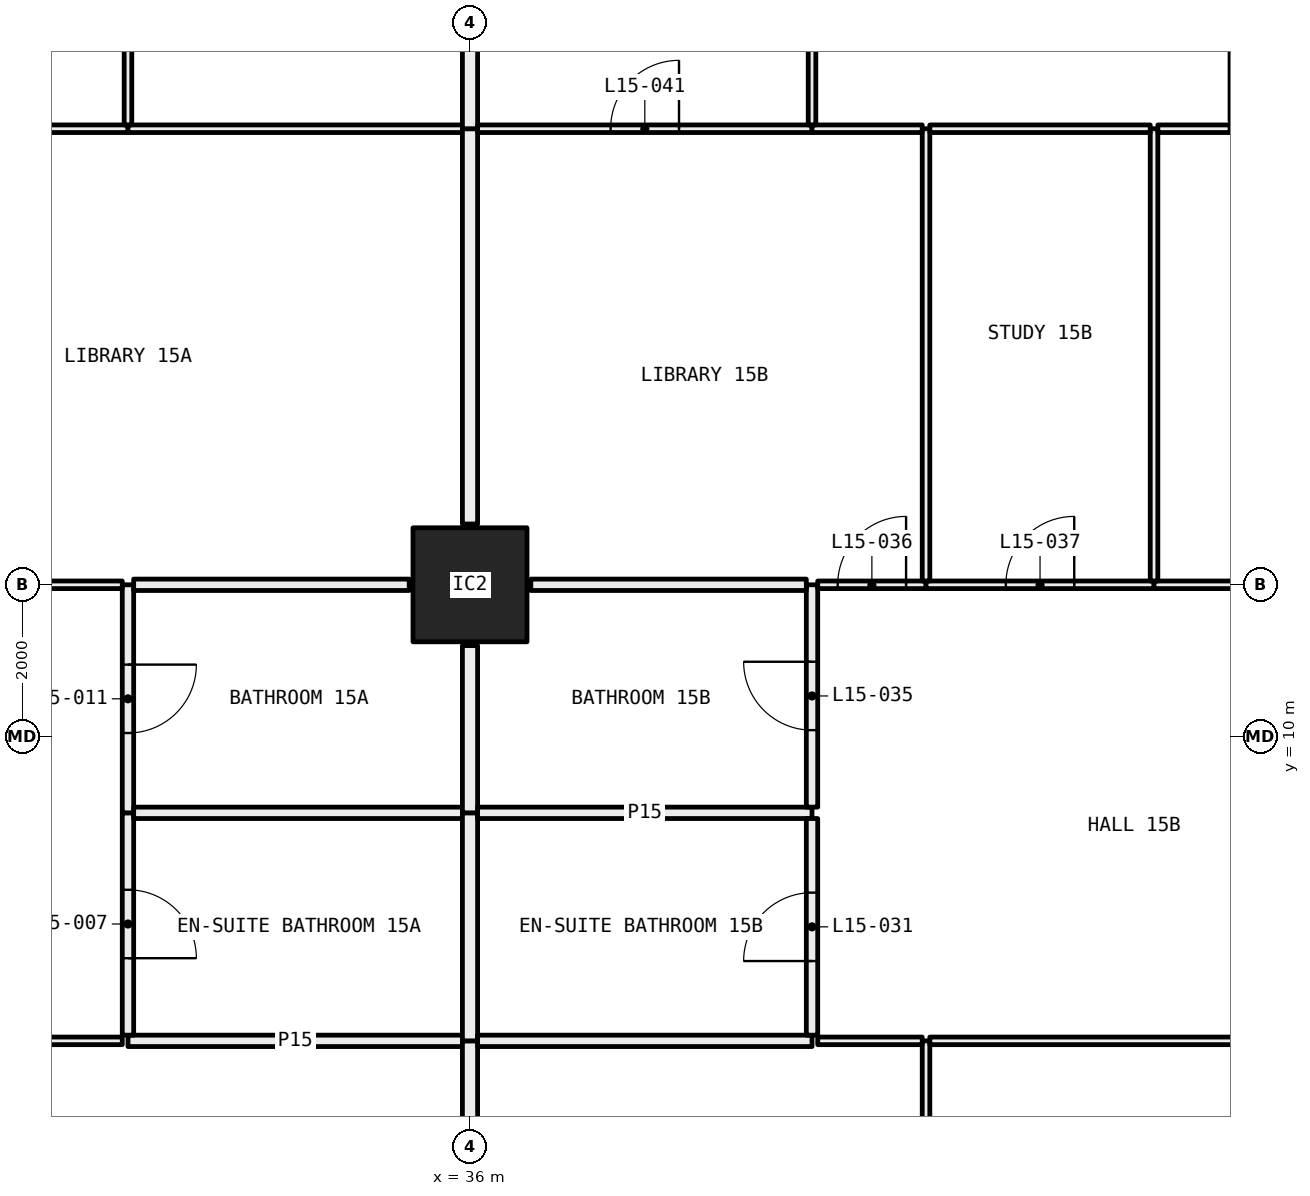
"""IFC4 building model, lengths in metres.
Left out: names, types, materials, properties, quantities, classifications, styles, units other than length and angle.
Written with IfcOpenShell. Run it as: python <this file> out.ifc"""

import sys

from ifc_helpers import new_model, si_unit, direction, frame, frame_2d, origin, origin_2d, place, context, subcontext, project, spatial, rectangle, hollow_rectangle, extrude, element, fill, save


model = new_model("IFC4")
c1 = context("Model", 3, precision=1e-05, world=origin(), true_north=direction((0.0, 1.0)))
c2 = subcontext(c1, "Body", "Model", "MODEL_VIEW")
j1 = project(units=[si_unit("LENGTHUNIT", "METRE"), si_unit("PLANEANGLEUNIT", "RADIAN")], contexts=[c1])
p1 = place(None, origin())
s1 = spatial("IfcSite", under=j1, at=p1, CompositionType="ELEMENT")
p2 = place(p1, origin())
s2 = spatial("IfcBuilding", under=s1, at=p2, CompositionType="ELEMENT")
p3 = place(p2, frame((0.0, 0.0, 64.5)))
s3 = spatial("IfcBuildingStorey", under=s2, at=p3, CompositionType="ELEMENT", Elevation=64.5)
p4 = place(p3, frame((36.0, 12.0, 0.0), z_axis=(0.0, 0.0, 1.0), x_axis=(1.0, 0.0, 0.0)))
e1 = element("IfcColumn", 1, at=p4, inside=s3, PredefinedType="COLUMN", context=c2, shape_type="SweptSolid", body=[
    extrude(hollow_rectangle(XDim=1.5, YDim=1.5, WallThickness=0.065, at=origin_2d()), origin(), (0.0, 0.0, 1.0), 3.05),
])
p5 = place(p3, frame((31.425, 6.0, 0.0), z_axis=(0.0, 0.0, 1.0), x_axis=(-1.0, 0.0, 0.0)))
e2 = element("IfcWall", 2, at=p5, inside=s3, PredefinedType="PARTITIONING", context=c2, shape_type="SweptSolid", body=[
    extrude(rectangle(XDim=1.375, YDim=0.1, at=frame_2d((0.688, 0.0))), origin(), (0.0, 0.0, 1.0), 3.05),
])
p6 = place(p3, frame((35.9, 6.0, 0.0), z_axis=(0.0, 0.0, 1.0), x_axis=(-1.0, 0.0, 0.0)))
e3 = element("IfcWall", 3, at=p6, inside=s3, PredefinedType="PARTITIONING", context=c2, shape_type="SweptSolid", body=[
    extrude(rectangle(XDim=4.4, YDim=0.15, at=frame_2d((2.2, 0.0))), origin(), (0.0, 0.0, 1.0), 3.05),
])
p7 = place(p3, frame((36.0, 0.72, 0.0), z_axis=(0.0, 0.0, 1.0), x_axis=(0.0, 1.0, 0.0)))
e4 = element("IfcWall", 4, at=p7, inside=s3, PredefinedType="PARTITIONING", context=c2, shape_type="SweptSolid", body=[
    extrude(rectangle(XDim=5.28, YDim=0.2, at=frame_2d((2.64, 0.0))), origin(), (0.0, 0.0, 1.0), 2.45),
])
p8 = place(p3, frame((31.5, 6.075, 0.0), z_axis=(0.0, 0.0, 1.0), x_axis=(0.0, 1.0, 0.0)))
e5 = element("IfcWall", 5, at=p8, inside=s3, PredefinedType="PARTITIONING", context=c2, shape_type="SweptSolid", body=[
    extrude(rectangle(XDim=2.925, YDim=0.15, at=frame_2d((1.462, 0.0))), origin(), (0.0, 0.0, 1.0), 3.05),
])
p9 = place(p8, frame((1.012, 0.0, 0.0)))
e6 = element("IfcOpeningElement", 6, at=p9, cuts=e5, PredefinedType="OPENING", context=c2, shape_type="SweptSolid", body=[
    extrude(rectangle(XDim=0.9, YDim=2.1, at=frame_2d((0.45, 1.05))), frame((0.0, 0.085, 0.0), z_axis=(0.0, -1.0, 0.0), x_axis=(1.0, 0.0, 0.0)), (0.0, 0.0, 1.0), 0.17),
])
p10 = place(p3, frame((31.5, 9.0, 0.0), z_axis=(0.0, 0.0, 1.0), x_axis=(0.0, 1.0, 0.0)))
e7 = element("IfcWall", 7, at=p10, inside=s3, PredefinedType="PARTITIONING", context=c2, shape_type="SweptSolid", body=[
    extrude(rectangle(XDim=3.0, YDim=0.15, at=frame_2d((1.5, 0.0))), origin(), (0.0, 0.0, 1.0), 2.45),
])
p11 = place(p10, frame((1.05, 0.0, 0.0)))
e8 = element("IfcOpeningElement", 8, at=p11, cuts=e7, PredefinedType="OPENING", context=c2, shape_type="SweptSolid", body=[
    extrude(rectangle(XDim=0.9, YDim=2.1, at=frame_2d((0.45, 1.05))), frame((0.0, 0.085, 0.0), z_axis=(0.0, -1.0, 0.0), x_axis=(1.0, 0.0, 0.0)), (0.0, 0.0, 1.0), 0.17),
])
p12 = place(p3, frame((31.425, 12.0, 0.0), z_axis=(0.0, 0.0, 1.0), x_axis=(-1.0, 0.0, 0.0)))
e9 = element("IfcWall", 9, at=p12, inside=s3, PredefinedType="PARTITIONING", context=c2, shape_type="SweptSolid", body=[
    extrude(rectangle(XDim=4.425, YDim=0.1, at=frame_2d((2.212, 0.0))), origin(), (0.0, 0.0, 1.0), 2.45),
])
p13 = place(p12, frame((1.762, 0.0, 0.0)))
e10 = element("IfcOpeningElement", 10, at=p13, cuts=e9, PredefinedType="OPENING", context=c2, shape_type="SweptSolid", body=[
    extrude(rectangle(XDim=0.9, YDim=2.1, at=frame_2d((0.45, 1.05))), frame((0.0, 0.06, 0.0), z_axis=(0.0, -1.0, 0.0), x_axis=(1.0, 0.0, 0.0)), (0.0, 0.0, 1.0), 0.12),
])
p14 = place(p3, frame((35.9, 9.0, 0.0), z_axis=(0.0, 0.0, 1.0), x_axis=(-1.0, 0.0, 0.0)))
e11 = element("IfcWall", 11, at=p14, inside=s3, PredefinedType="PARTITIONING", context=c2, shape_type="SweptSolid", body=[
    extrude(rectangle(XDim=4.325, YDim=0.15, at=frame_2d((2.163, 0.0))), origin(), (0.0, 0.0, 1.0), 3.05),
])
p15 = place(p3, frame((36.0, 6.0, 0.0), z_axis=(0.0, 0.0, 1.0), x_axis=(0.0, 1.0, 0.0)))
e12 = element("IfcWall", 12, at=p15, inside=s3, PredefinedType="PARTITIONING", context=c2, shape_type="SweptSolid", body=[
    extrude(rectangle(XDim=3.0, YDim=0.2, at=frame_2d((1.5, 0.0))), origin(), (0.0, 0.0, 1.0), 2.45),
])
p16 = place(p3, frame((35.2, 12.0, 0.0), z_axis=(0.0, 0.0, 1.0), x_axis=(-1.0, 0.0, 0.0)))
e13 = element("IfcWall", 13, at=p16, inside=s3, PredefinedType="PARTITIONING", context=c2, shape_type="SweptSolid", body=[
    extrude(rectangle(XDim=3.625, YDim=0.15, at=frame_2d((1.812, 0.0))), origin(), (0.0, 0.0, 1.0), 2.45),
])
p17 = place(p3, frame((36.0, 9.0, 0.0), z_axis=(0.0, 0.0, 1.0), x_axis=(0.0, 1.0, 0.0)))
e14 = element("IfcWall", 14, at=p17, inside=s3, PredefinedType="PARTITIONING", context=c2, shape_type="SweptSolid", body=[
    extrude(rectangle(XDim=2.2, YDim=0.2, at=frame_2d((1.1, 0.0))), origin(), (0.0, 0.0, 1.0), 2.45),
])
p18 = place(p3, frame((31.5, 18.0, 0.0), z_axis=(0.0, 0.0, 1.0), x_axis=(-1.0, 0.0, 0.0)))
e15 = element("IfcWall", 15, at=p18, inside=s3, PredefinedType="PARTITIONING", context=c2, shape_type="SweptSolid", body=[
    extrude(rectangle(XDim=4.45, YDim=0.1, at=frame_2d((2.225, 0.0))), origin(), (0.0, 0.0, 1.0), 3.05),
])
p19 = place(p18, frame((1.775, 0.0, 0.0)))
e16 = element("IfcOpeningElement", 16, at=p19, cuts=e15, PredefinedType="OPENING", context=c2, shape_type="SweptSolid", body=[
    extrude(rectangle(XDim=0.9, YDim=2.1, at=frame_2d((0.45, 1.05))), frame((0.0, 0.06, 0.0), z_axis=(0.0, -1.0, 0.0), x_axis=(1.0, 0.0, 0.0)), (0.0, 0.0, 1.0), 0.12),
])
p20 = place(p3, frame((35.9, 18.0, 0.0), z_axis=(0.0, 0.0, 1.0), x_axis=(-1.0, 0.0, 0.0)))
e17 = element("IfcWall", 17, at=p20, inside=s3, PredefinedType="PARTITIONING", context=c2, shape_type="SweptSolid", body=[
    extrude(rectangle(XDim=4.4, YDim=0.1, at=frame_2d((2.2, 0.0))), origin(), (0.0, 0.0, 1.0), 3.05),
])
p21 = place(p3, frame((36.0, 12.8, 0.0), z_axis=(0.0, 0.0, 1.0), x_axis=(0.0, 1.0, 0.0)))
e18 = element("IfcWall", 18, at=p21, inside=s3, PredefinedType="PARTITIONING", context=c2, shape_type="SweptSolid", body=[
    extrude(rectangle(XDim=5.2, YDim=0.2, at=frame_2d((2.6, 0.0))), origin(), (0.0, 0.0, 1.0), 2.45),
])
p22 = place(p3, frame((31.5, 18.05, 0.0), z_axis=(0.0, 0.0, 1.0), x_axis=(0.0, 1.0, 0.0)))
e19 = element("IfcWall", 19, at=p22, inside=s3, PredefinedType="PARTITIONING", context=c2, shape_type="SweptSolid", body=[
    extrude(rectangle(XDim=6.25, YDim=0.1, at=frame_2d((3.125, 0.0))), origin(), (0.0, 0.0, 1.0), 2.45),
])
p23 = place(p22, frame((2.675, 0.0, 0.0)))
e20 = element("IfcOpeningElement", 20, at=p23, cuts=e19, PredefinedType="OPENING", context=c2, shape_type="SweptSolid", body=[
    extrude(rectangle(XDim=0.9, YDim=2.1, at=frame_2d((0.45, 1.05))), frame((0.0, 0.06, 0.0), z_axis=(0.0, -1.0, 0.0), x_axis=(1.0, 0.0, 0.0)), (0.0, 0.0, 1.0), 0.12),
])
p24 = place(p3, frame((36.0, 18.0, 0.0), z_axis=(0.0, 0.0, 1.0), x_axis=(0.0, 1.0, 0.0)))
e21 = element("IfcWall", 21, at=p24, inside=s3, PredefinedType="PARTITIONING", context=c2, shape_type="SweptSolid", body=[
    extrude(rectangle(XDim=5.2, YDim=0.2, at=frame_2d((2.6, 0.0))), origin(), (0.0, 0.0, 1.0), 2.45),
])
p25 = place(p3, frame((42.0, 0.72, 0.0), z_axis=(0.0, 0.0, 1.0), x_axis=(0.0, 1.0, 0.0)))
e22 = element("IfcWall", 22, at=p25, inside=s3, PredefinedType="PARTITIONING", context=c2, shape_type="SweptSolid", body=[
    extrude(rectangle(XDim=5.28, YDim=0.1, at=frame_2d((2.64, 0.0))), origin(), (0.0, 0.0, 1.0), 3.05),
])
p26 = place(p25, frame((2.19, 0.0, 0.0)))
e23 = element("IfcOpeningElement", 23, at=p26, cuts=e22, PredefinedType="OPENING", context=c2, shape_type="SweptSolid", body=[
    extrude(rectangle(XDim=0.9, YDim=2.1, at=frame_2d((0.45, 1.05))), frame((0.0, 0.06, 0.0), z_axis=(0.0, -1.0, 0.0), x_axis=(1.0, 0.0, 0.0)), (0.0, 0.0, 1.0), 0.12),
])
p27 = place(p3, frame((40.5, 6.0, 0.0), z_axis=(0.0, 0.0, 1.0), x_axis=(-1.0, 0.0, 0.0)))
e24 = element("IfcWall", 24, at=p27, inside=s3, PredefinedType="PARTITIONING", context=c2, shape_type="SweptSolid", body=[
    extrude(rectangle(XDim=4.4, YDim=0.15, at=frame_2d((2.2, 0.0))), origin(), (0.0, 0.0, 1.0), 3.05),
])
p28 = place(p3, frame((41.95, 6.0, 0.0), z_axis=(0.0, 0.0, 1.0), x_axis=(-1.0, 0.0, 0.0)))
e25 = element("IfcWall", 25, at=p28, inside=s3, PredefinedType="PARTITIONING", context=c2, shape_type="SweptSolid", body=[
    extrude(rectangle(XDim=1.375, YDim=0.1, at=frame_2d((0.688, 0.0))), origin(), (0.0, 0.0, 1.0), 3.05),
])
p29 = place(p3, frame((48.195, 6.0, 0.0), z_axis=(0.0, 0.0, 1.0), x_axis=(-1.0, 0.0, 0.0)))
e26 = element("IfcWall", 26, at=p29, inside=s3, PredefinedType="PARTITIONING", context=c2, shape_type="SweptSolid", body=[
    extrude(rectangle(XDim=6.145, YDim=0.1, at=frame_2d((3.073, 0.0))), origin(), (0.0, 0.0, 1.0), 2.45),
])
p30 = place(p3, frame((40.5, 9.0, 0.0), z_axis=(0.0, 0.0, 1.0), x_axis=(-1.0, 0.0, 0.0)))
e27 = element("IfcWall", 27, at=p30, inside=s3, PredefinedType="PARTITIONING", context=c2, shape_type="SweptSolid", body=[
    extrude(rectangle(XDim=4.4, YDim=0.15, at=frame_2d((2.2, 0.0))), origin(), (0.0, 0.0, 1.0), 3.05),
])
p31 = place(p3, frame((40.5, 6.075, 0.0), z_axis=(0.0, 0.0, 1.0), x_axis=(0.0, 1.0, 0.0)))
e28 = element("IfcWall", 28, at=p31, inside=s3, PredefinedType="PARTITIONING", context=c2, shape_type="SweptSolid", body=[
    extrude(rectangle(XDim=2.85, YDim=0.15, at=frame_2d((1.425, 0.0))), origin(), (0.0, 0.0, 1.0), 3.05),
])
p32 = place(p31, frame((0.975, 0.0, 0.0)))
e29 = element("IfcOpeningElement", 29, at=p32, cuts=e28, PredefinedType="OPENING", context=c2, shape_type="SweptSolid", body=[
    extrude(rectangle(XDim=0.9, YDim=2.1, at=frame_2d((0.45, 1.05))), frame((0.0, 0.085, 0.0), z_axis=(0.0, -1.0, 0.0), x_axis=(1.0, 0.0, 0.0)), (0.0, 0.0, 1.0), 0.17),
])
p33 = place(p3, frame((40.5, 9.075, 0.0), z_axis=(0.0, 0.0, 1.0), x_axis=(0.0, 1.0, 0.0)))
e30 = element("IfcWall", 30, at=p33, inside=s3, PredefinedType="PARTITIONING", context=c2, shape_type="SweptSolid", body=[
    extrude(rectangle(XDim=2.925, YDim=0.15, at=frame_2d((1.462, 0.0))), origin(), (0.0, 0.0, 1.0), 2.45),
])
p34 = place(p33, frame((1.012, 0.0, 0.0)))
e31 = element("IfcOpeningElement", 31, at=p34, cuts=e30, PredefinedType="OPENING", context=c2, shape_type="SweptSolid", body=[
    extrude(rectangle(XDim=0.9, YDim=2.1, at=frame_2d((0.45, 1.05))), frame((0.0, 0.085, 0.0), z_axis=(0.0, -1.0, 0.0), x_axis=(1.0, 0.0, 0.0)), (0.0, 0.0, 1.0), 0.17),
])
p35 = place(p3, frame((40.425, 12.0, 0.0), z_axis=(0.0, 0.0, 1.0), x_axis=(-1.0, 0.0, 0.0)))
e32 = element("IfcWall", 32, at=p35, inside=s3, PredefinedType="PARTITIONING", context=c2, shape_type="SweptSolid", body=[
    extrude(rectangle(XDim=3.625, YDim=0.15, at=frame_2d((1.812, 0.0))), origin(), (0.0, 0.0, 1.0), 2.45),
])
p36 = place(p3, frame((42.0, 12.0, 0.0), z_axis=(0.0, 0.0, 1.0), x_axis=(-1.0, 0.0, 0.0)))
e33 = element("IfcWall", 33, at=p36, inside=s3, PredefinedType="PARTITIONING", context=c2, shape_type="SweptSolid", body=[
    extrude(rectangle(XDim=1.425, YDim=0.1, at=frame_2d((0.712, 0.0))), origin(), (0.0, 0.0, 1.0), 2.45),
])
p37 = place(p36, frame((0.262, 0.0, 0.0)))
e34 = element("IfcOpeningElement", 34, at=p37, cuts=e33, PredefinedType="OPENING", context=c2, shape_type="SweptSolid", body=[
    extrude(rectangle(XDim=0.9, YDim=2.1, at=frame_2d((0.45, 1.05))), frame((0.0, 0.06, 0.0), z_axis=(0.0, -1.0, 0.0), x_axis=(1.0, 0.0, 0.0)), (0.0, 0.0, 1.0), 0.12),
])
p38 = place(p3, frame((45.0, 12.0, 0.0), z_axis=(0.0, 0.0, 1.0), x_axis=(-1.0, 0.0, 0.0)))
e35 = element("IfcWall", 35, at=p38, inside=s3, PredefinedType="PARTITIONING", context=c2, shape_type="SweptSolid", body=[
    extrude(rectangle(XDim=3.0, YDim=0.1, at=frame_2d((1.5, 0.0))), origin(), (0.0, 0.0, 1.0), 2.45),
])
p39 = place(p38, frame((1.05, 0.0, 0.0)))
e36 = element("IfcOpeningElement", 36, at=p39, cuts=e35, PredefinedType="OPENING", context=c2, shape_type="SweptSolid", body=[
    extrude(rectangle(XDim=0.9, YDim=2.1, at=frame_2d((0.45, 1.05))), frame((0.0, 0.06, 0.0), z_axis=(0.0, -1.0, 0.0), x_axis=(1.0, 0.0, 0.0)), (0.0, 0.0, 1.0), 0.12),
])
p40 = place(p3, frame((47.2, 12.0, 0.0), z_axis=(0.0, 0.0, 1.0), x_axis=(-1.0, 0.0, 0.0)))
e37 = element("IfcWall", 37, at=p40, inside=s3, PredefinedType="PARTITIONING", context=c2, shape_type="SweptSolid", body=[
    extrude(rectangle(XDim=2.2, YDim=0.1, at=frame_2d((1.1, 0.0))), origin(), (0.0, 0.0, 1.0), 2.45),
])
p41 = place(p3, frame((42.0, 12.05, 0.0), z_axis=(0.0, 0.0, 1.0), x_axis=(0.0, 1.0, 0.0)))
e38 = element("IfcWall", 38, at=p41, inside=s3, PredefinedType="PARTITIONING", context=c2, shape_type="SweptSolid", body=[
    extrude(rectangle(XDim=5.95, YDim=0.1, at=frame_2d((2.975, 0.0))), origin(), (0.0, 0.0, 1.0), 2.45),
])
p42 = place(p3, frame((40.5, 18.0, 0.0), z_axis=(0.0, 0.0, 1.0), x_axis=(-1.0, 0.0, 0.0)))
e39 = element("IfcWall", 39, at=p42, inside=s3, PredefinedType="PARTITIONING", context=c2, shape_type="SweptSolid", body=[
    extrude(rectangle(XDim=4.4, YDim=0.1, at=frame_2d((2.2, 0.0))), origin(), (0.0, 0.0, 1.0), 3.05),
])
p43 = place(p42, frame((1.75, 0.0, 0.0)))
e40 = element("IfcOpeningElement", 40, at=p43, cuts=e39, PredefinedType="OPENING", context=c2, shape_type="SweptSolid", body=[
    extrude(rectangle(XDim=0.9, YDim=2.1, at=frame_2d((0.45, 1.05))), frame((0.0, 0.06, 0.0), z_axis=(0.0, -1.0, 0.0), x_axis=(1.0, 0.0, 0.0)), (0.0, 0.0, 1.0), 0.12),
])
p44 = place(p3, frame((41.95, 18.0, 0.0), z_axis=(0.0, 0.0, 1.0), x_axis=(-1.0, 0.0, 0.0)))
e41 = element("IfcWall", 41, at=p44, inside=s3, PredefinedType="PARTITIONING", context=c2, shape_type="SweptSolid", body=[
    extrude(rectangle(XDim=1.45, YDim=0.1, at=frame_2d((0.725, 0.0))), origin(), (0.0, 0.0, 1.0), 3.05),
])
p45 = place(p3, frame((45.0, 12.05, 0.0), z_axis=(0.0, 0.0, 1.0), x_axis=(0.0, 1.0, 0.0)))
e42 = element("IfcWall", 42, at=p45, inside=s3, PredefinedType="PARTITIONING", context=c2, shape_type="SweptSolid", body=[
    extrude(rectangle(XDim=5.95, YDim=0.1, at=frame_2d((2.975, 0.0))), origin(), (0.0, 0.0, 1.0), 2.45),
])
p46 = place(p3, frame((44.95, 18.0, 0.0), z_axis=(0.0, 0.0, 1.0), x_axis=(-1.0, 0.0, 0.0)))
e43 = element("IfcWall", 43, at=p46, inside=s3, PredefinedType="PARTITIONING", context=c2, shape_type="SweptSolid", body=[
    extrude(rectangle(XDim=2.9, YDim=0.1, at=frame_2d((1.45, 0.0))), origin(), (0.0, 0.0, 1.0), 3.05),
])
p47 = place(p3, frame((46.0, 18.0, 0.0), z_axis=(0.0, 0.0, 1.0), x_axis=(-1.0, 0.0, 0.0)))
e44 = element("IfcWall", 44, at=p47, inside=s3, PredefinedType="PARTITIONING", context=c2, shape_type="SweptSolid", body=[
    extrude(rectangle(XDim=0.95, YDim=0.1, at=frame_2d((0.475, 0.0))), origin(), (0.0, 0.0, 1.0), 3.05),
])
p48 = place(p3, frame((40.5, 18.05, 0.0), z_axis=(0.0, 0.0, 1.0), x_axis=(0.0, 1.0, 0.0)))
e45 = element("IfcWall", 45, at=p48, inside=s3, PredefinedType="PARTITIONING", context=c2, shape_type="SweptSolid", body=[
    extrude(rectangle(XDim=6.175, YDim=0.1, at=frame_2d((3.087, 0.0))), origin(), (0.0, 0.0, 1.0), 2.45),
])
p49 = place(p48, frame((2.637, 0.0, 0.0)))
e46 = element("IfcOpeningElement", 46, at=p49, cuts=e45, PredefinedType="OPENING", context=c2, shape_type="SweptSolid", body=[
    extrude(rectangle(XDim=0.9, YDim=2.1, at=frame_2d((0.45, 1.05))), frame((0.0, 0.06, 0.0), z_axis=(0.0, -1.0, 0.0), x_axis=(1.0, 0.0, 0.0)), (0.0, 0.0, 1.0), 0.12),
])
p50 = place(p9, frame((0.9, 0.0, 0.0), x_axis=(-1.0, 0.0, 0.0)))
e47 = element("IfcDoor", 47, at=p50, inside=s3, OperationType="SINGLE_SWING_LEFT", PredefinedType="DOOR", context=c2, shape_type="SweptSolid", body=[
    extrude(rectangle(XDim=0.9, YDim=2.1, at=frame_2d((0.45, 1.05))), frame((0.0, 0.025, 0.0), z_axis=(0.0, -1.0, 0.0), x_axis=(1.0, 0.0, 0.0)), (0.0, 0.0, 1.0), 0.05),
])
fill(e6, e47)
p51 = place(p11, frame((0.9, 0.0, 0.0), x_axis=(-1.0, 0.0, 0.0)))
e48 = element("IfcDoor", 48, at=p51, inside=s3, OperationType="SINGLE_SWING_RIGHT", PredefinedType="DOOR", context=c2, shape_type="SweptSolid", body=[
    extrude(rectangle(XDim=0.9, YDim=2.1, at=frame_2d((0.45, 1.05))), frame((0.0, 0.025, 0.0), z_axis=(0.0, -1.0, 0.0), x_axis=(1.0, 0.0, 0.0)), (0.0, 0.0, 1.0), 0.05),
])
fill(e8, e48)
p52 = place(p32, origin())
e49 = element("IfcDoor", 49, at=p52, inside=s3, OperationType="SINGLE_SWING_RIGHT", PredefinedType="DOOR", context=c2, shape_type="SweptSolid", body=[
    extrude(rectangle(XDim=0.9, YDim=2.1, at=frame_2d((0.45, 1.05))), frame((0.0, 0.025, 0.0), z_axis=(0.0, -1.0, 0.0), x_axis=(1.0, 0.0, 0.0)), (0.0, 0.0, 1.0), 0.05),
])
fill(e29, e49)
p53 = place(p34, origin())
e50 = element("IfcDoor", 50, at=p53, inside=s3, OperationType="SINGLE_SWING_LEFT", PredefinedType="DOOR", context=c2, shape_type="SweptSolid", body=[
    extrude(rectangle(XDim=0.9, YDim=2.1, at=frame_2d((0.45, 1.05))), frame((0.0, 0.025, 0.0), z_axis=(0.0, -1.0, 0.0), x_axis=(1.0, 0.0, 0.0)), (0.0, 0.0, 1.0), 0.05),
])
fill(e31, e50)
p54 = place(p37, frame((0.9, 0.0, 0.0), x_axis=(-1.0, 0.0, 0.0)))
e51 = element("IfcDoor", 51, at=p54, inside=s3, OperationType="SINGLE_SWING_LEFT", PredefinedType="DOOR", context=c2, shape_type="SweptSolid", body=[
    extrude(rectangle(XDim=0.9, YDim=2.1, at=frame_2d((0.45, 1.05))), frame((0.0, 0.025, 0.0), z_axis=(0.0, -1.0, 0.0), x_axis=(1.0, 0.0, 0.0)), (0.0, 0.0, 1.0), 0.05),
])
fill(e34, e51)
p55 = place(p39, frame((0.9, 0.0, 0.0), x_axis=(-1.0, 0.0, 0.0)))
e52 = element("IfcDoor", 52, at=p55, inside=s3, OperationType="SINGLE_SWING_LEFT", PredefinedType="DOOR", context=c2, shape_type="SweptSolid", body=[
    extrude(rectangle(XDim=0.9, YDim=2.1, at=frame_2d((0.45, 1.05))), frame((0.0, 0.025, 0.0), z_axis=(0.0, -1.0, 0.0), x_axis=(1.0, 0.0, 0.0)), (0.0, 0.0, 1.0), 0.05),
])
fill(e36, e52)
p56 = place(p43, frame((0.9, 0.0, 0.0), x_axis=(-1.0, 0.0, 0.0)))
e53 = element("IfcDoor", 53, at=p56, inside=s3, OperationType="SINGLE_SWING_LEFT", PredefinedType="DOOR", context=c2, shape_type="SweptSolid", body=[
    extrude(rectangle(XDim=0.9, YDim=2.1, at=frame_2d((0.45, 1.05))), frame((0.0, 0.025, 0.0), z_axis=(0.0, -1.0, 0.0), x_axis=(1.0, 0.0, 0.0)), (0.0, 0.0, 1.0), 0.05),
])
fill(e40, e53)
save(model, sys.argv[1])
